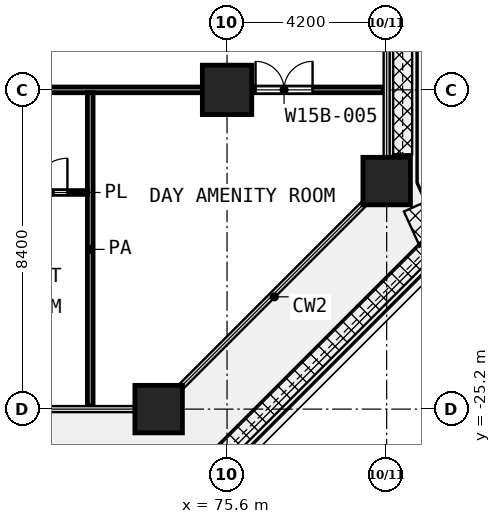
"""IFC4 building model, lengths in metres.
Left out: names, types, materials, properties, quantities, classifications, styles, units other than length and angle.
Written with IfcOpenShell. Run it as: python <this file> out.ifc"""

import sys

from ifc_helpers import new_model, si_unit, direction, frame, frame_2d, origin, origin_2d, place, context, subcontext, project, spatial, rectangle, extrude, element, fill, save


model = new_model("IFC4")
c1 = context("Model", 3, precision=1e-05, world=origin(), true_north=direction((0.0, 1.0)))
c2 = subcontext(c1, "Body", "Model", "MODEL_VIEW")
j1 = project(units=[si_unit("LENGTHUNIT", "METRE"), si_unit("PLANEANGLEUNIT", "RADIAN")], contexts=[c1])
p1 = place(None, origin())
s1 = spatial("IfcSite", under=j1, at=p1, CompositionType="ELEMENT")
p2 = place(p1, origin())
s2 = spatial("IfcBuilding", under=s1, at=p2, CompositionType="ELEMENT")
p3 = place(p2, frame((0.0, 0.0, 85.4)))
s3 = spatial("IfcBuildingStorey", under=s2, at=p3, CompositionType="ELEMENT", Elevation=85.4)
p4 = place(p3, frame((75.6, -16.8, 0.0), z_axis=(0.0, 0.0, 1.0), x_axis=(1.0, 0.0, 0.0)))
e1 = element("IfcColumn", 1, at=p4, inside=s3, PredefinedType="COLUMN", context=c2, shape_type="SweptSolid", body=[
    extrude(rectangle(XDim=1.3, YDim=1.3, at=origin_2d()), origin(), (0.0, 0.0, 1.0), 4.2),
])
for number, where, z_axis, x_axis in (
    (2, (79.8, -19.2, 0.0), (0.0, 0.0, 1.0), (1.0, 0.0, 0.0)),
    (3, (73.8, -25.2, 0.0), (0.0, 0.0, 1.0), (1.0, 0.0, 0.0)),
):
    element("IfcColumn", number, at=place(p3, frame(where, z_axis=z_axis, x_axis=x_axis)), inside=s3, PredefinedType="COLUMN", context=c2, shape_type="SweptSolid", body=[
        extrude(rectangle(XDim=1.25, YDim=1.25, at=origin_2d()), origin(), (0.0, 0.0, 1.0), 4.2),
    ])
p5 = place(p3, frame((69.95, -19.5, 0.0), z_axis=(0.0, 0.0, 1.0), x_axis=(1.0, 0.0, 0.0)))
e4 = element("IfcWall", 4, at=p5, inside=s3, PredefinedType="PARTITIONING", context=c2, shape_type="SweptSolid", body=[
    extrude(rectangle(XDim=1.975, YDim=0.1, at=frame_2d((0.988, 0.0))), origin(), (0.0, 0.0, 1.0), 3.9),
])
p6 = place(p5, frame((0.55, 0.0, 0.0)))
e5 = element("IfcOpeningElement", 5, at=p6, cuts=e4, PredefinedType="OPENING", context=c2, shape_type="SweptSolid", body=[
    extrude(rectangle(XDim=0.9, YDim=2.1, at=frame_2d((0.45, 1.05))), frame((0.0, 0.06, 0.0), z_axis=(0.0, -1.0, 0.0), x_axis=(1.0, 0.0, 0.0)), (0.0, 0.0, 1.0), 0.12),
])
p7 = place(p3, frame((51.05, -16.8, 0.0), z_axis=(0.0, 0.0, 1.0), x_axis=(1.0, 0.0, 0.0)))
e6 = element("IfcWall", 6, at=p7, inside=s3, PredefinedType="PARTITIONING", context=c2, shape_type="SweptSolid", body=[
    extrude(rectangle(XDim=28.67, YDim=0.15, at=frame_2d((14.335, 0.0))), origin(), (0.0, 0.0, 1.0), 3.9),
])
p8 = place(p7, frame((0.975, 0.0, 0.0)))
e7 = element("IfcOpeningElement", 7, at=p8, cuts=e6, PredefinedType="OPENING", context=c2, shape_type="SweptSolid", body=[
    extrude(rectangle(XDim=1.0, YDim=2.1, at=frame_2d((0.5, 1.05))), frame((0.0, 0.085, 0.0), z_axis=(0.0, -1.0, 0.0), x_axis=(1.0, 0.0, 0.0)), (0.0, 0.0, 1.0), 0.17),
])
p9 = place(p7, frame((5.85, 0.0, 0.0)))
e8 = element("IfcOpeningElement", 8, at=p9, cuts=e6, PredefinedType="OPENING", context=c2, shape_type="SweptSolid", body=[
    extrude(rectangle(XDim=1.2, YDim=2.1, at=frame_2d((0.6, 1.05))), frame((0.0, 0.085, 0.0), z_axis=(0.0, -1.0, 0.0), x_axis=(1.0, 0.0, 0.0)), (0.0, 0.0, 1.0), 0.17),
])
p10 = place(p7, frame((8.45, 0.0, 0.0)))
e9 = element("IfcOpeningElement", 9, at=p10, cuts=e6, PredefinedType="OPENING", context=c2, shape_type="SweptSolid", body=[
    extrude(rectangle(XDim=1.2, YDim=2.1, at=frame_2d((0.6, 1.05))), frame((0.0, 0.085, 0.0), z_axis=(0.0, -1.0, 0.0), x_axis=(1.0, 0.0, 0.0)), (0.0, 0.0, 1.0), 0.17),
])
p11 = place(p7, frame((14.25, 0.0, 0.0)))
e10 = element("IfcOpeningElement", 10, at=p11, cuts=e6, PredefinedType="OPENING", context=c2, shape_type="SweptSolid", body=[
    extrude(rectangle(XDim=1.2, YDim=2.1, at=frame_2d((0.6, 1.05))), frame((0.0, 0.085, 0.0), z_axis=(0.0, -1.0, 0.0), x_axis=(1.0, 0.0, 0.0)), (0.0, 0.0, 1.0), 0.17),
])
p12 = place(p7, frame((17.35, 0.0, 0.0)))
e11 = element("IfcOpeningElement", 11, at=p12, cuts=e6, PredefinedType="OPENING", context=c2, shape_type="SweptSolid", body=[
    extrude(rectangle(XDim=1.2, YDim=2.1, at=frame_2d((0.6, 1.05))), frame((0.0, 0.085, 0.0), z_axis=(0.0, -1.0, 0.0), x_axis=(1.0, 0.0, 0.0)), (0.0, 0.0, 1.0), 0.17),
])
p13 = place(p7, frame((25.3, 0.0, 0.0)))
e12 = element("IfcOpeningElement", 12, at=p13, cuts=e6, PredefinedType="OPENING", context=c2, shape_type="SweptSolid", body=[
    extrude(rectangle(XDim=1.5, YDim=2.1, at=frame_2d((0.75, 1.05))), frame((0.0, 0.085, 0.0), z_axis=(0.0, -1.0, 0.0), x_axis=(1.0, 0.0, 0.0)), (0.0, 0.0, 1.0), 0.17),
])
p14 = place(p3, frame((72.0, -25.12, 0.0), z_axis=(0.0, 0.0, 1.0), x_axis=(0.0, 1.0, 0.0)))
e13 = element("IfcWall", 13, at=p14, inside=s3, PredefinedType="PARTITIONING", context=c2, shape_type="SweptSolid", body=[
    extrude(rectangle(XDim=8.245, YDim=0.15, at=frame_2d((4.123, 0.0))), origin(), (0.0, 0.0, 1.0), 3.9),
])
p15 = place(p6, origin())
e14 = element("IfcDoor", 14, at=p15, inside=s3, OperationType="SINGLE_SWING_RIGHT", PredefinedType="DOOR", context=c2, shape_type="SweptSolid", body=[
    extrude(rectangle(XDim=0.9, YDim=2.1, at=frame_2d((0.45, 1.05))), frame((0.0, 0.025, 0.0), z_axis=(0.0, -1.0, 0.0), x_axis=(1.0, 0.0, 0.0)), (0.0, 0.0, 1.0), 0.05),
])
fill(e5, e14)
p16 = place(p13, origin())
e15 = element("IfcDoor", 15, at=p16, inside=s3, OperationType="DOUBLE_DOOR_SINGLE_SWING", PredefinedType="DOOR", context=c2, shape_type="SweptSolid", body=[
    extrude(rectangle(XDim=1.5, YDim=2.1, at=frame_2d((0.75, 1.05))), frame((0.0, 0.025, 0.0), z_axis=(0.0, -1.0, 0.0), x_axis=(1.0, 0.0, 0.0)), (0.0, 0.0, 1.0), 0.05),
])
fill(e12, e15)
save(model, sys.argv[1])
